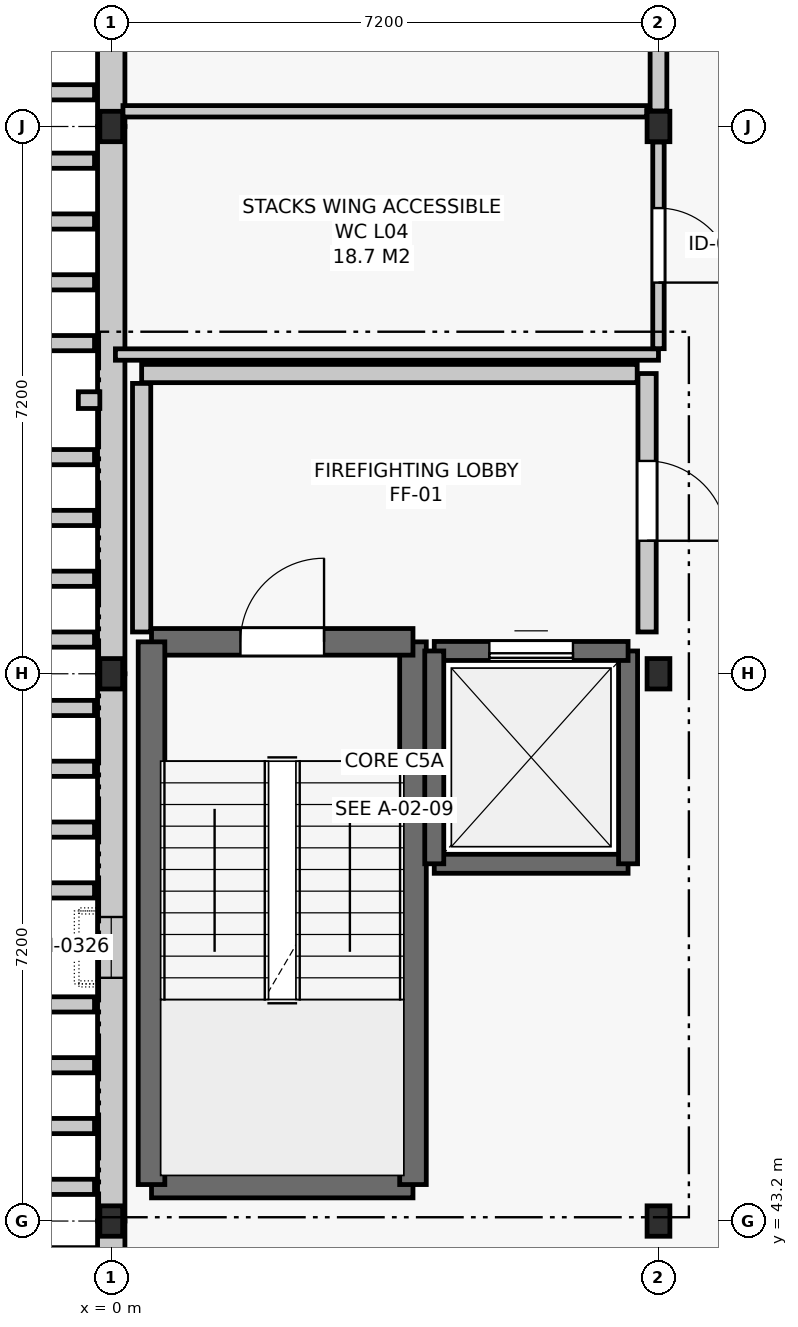
"""IFC4 building model, lengths in metres.
Left out: names, types, materials, properties, quantities, classifications, styles, units other than length and angle.
Written with IfcOpenShell. Run it as: python <this file> out.ifc"""

import sys

from ifc_helpers import new_model, si_unit, direction, frame, frame_2d, origin, origin_2d, place, context, subcontext, project, spatial, rectangle, i_section, extrude, element, fill, save


model = new_model("IFC4")
c1 = context("Model", 3, precision=1e-05, world=origin(), true_north=direction((0.0, 1.0)))
c2 = subcontext(c1, "Body", "Model", "MODEL_VIEW")
j1 = project(units=[si_unit("LENGTHUNIT", "METRE"), si_unit("PLANEANGLEUNIT", "RADIAN")], contexts=[c1])
p1 = place(None, origin())
s1 = spatial("IfcSite", under=j1, at=p1, CompositionType="ELEMENT")
p2 = place(p1, origin())
s2 = spatial("IfcBuilding", under=s1, at=p2, CompositionType="ELEMENT")
p3 = place(p2, frame((0.0, 0.0, 18.6)))
s3 = spatial("IfcBuildingStorey", under=s2, at=p3, CompositionType="ELEMENT", Elevation=18.6)
for number, where, z_axis, x_axis in (
    (1, (0.0, 43.2, 0.0), (0.0, 0.0, 1.0), (1.0, 0.0, 0.0)),
    (2, (0.0, 50.4, 0.0), (0.0, 0.0, 1.0), (1.0, 0.0, 0.0)),
    (3, (0.0, 57.6, 0.0), (0.0, 0.0, 1.0), (1.0, 0.0, 0.0)),
    (4, (7.2, 43.2, 0.0), (0.0, 0.0, 1.0), (1.0, 0.0, 0.0)),
    (5, (7.2, 50.4, 0.0), (0.0, 0.0, 1.0), (1.0, 0.0, 0.0)),
    (6, (7.2, 57.6, 0.0), (0.0, 0.0, 1.0), (1.0, 0.0, 0.0)),
):
    element("IfcColumn", number, at=place(p3, frame(where, z_axis=z_axis, x_axis=x_axis)), inside=s3, PredefinedType="COLUMN", context=c2, shape_type="SweptSolid", body=[
        extrude(i_section(OverallWidth=0.3, OverallDepth=0.4, WebThickness=0.013, FlangeThickness=0.024, FilletRadius=0.027, at=origin_2d()), origin(), (0.0, 0.0, 1.0), 4.2),
    ])
p4 = place(p3, frame((0.0, 64.8, 0.0), z_axis=(0.0, 0.0, 1.0), x_axis=(0.0, -1.0, 0.0)))
e7 = element("IfcWall", 7, at=p4, inside=s3, PredefinedType="SOLIDWALL", context=c2, shape_type="SweptSolid", body=[
    extrude(rectangle(XDim=7.2, YDim=0.36, at=frame_2d((3.6, 0.0))), origin(), (0.0, 0.0, 1.0), 3.06),
])
p5 = place(p4, frame((3.2, 0.0, 0.95)))
e8 = element("IfcOpeningElement", 8, at=p5, cuts=e7, PredefinedType="OPENING", context=c2, shape_type="SweptSolid", body=[
    extrude(rectangle(XDim=0.8, YDim=2.15, at=frame_2d((0.4, 1.075))), frame((0.0, 0.192, 0.0), z_axis=(0.0, -1.0, 0.0), x_axis=(1.0, 0.0, 0.0)), (0.0, 0.0, 1.0), 0.384),
])
p6 = place(p3, frame((0.0, 57.6, 0.0), z_axis=(0.0, 0.0, 1.0), x_axis=(0.0, -1.0, 0.0)))
e9 = element("IfcWall", 9, at=p6, inside=s3, PredefinedType="SOLIDWALL", context=c2, shape_type="SweptSolid", body=[
    extrude(rectangle(XDim=7.2, YDim=0.36, at=frame_2d((3.6, 0.0))), origin(), (0.0, 0.0, 1.0), 3.06),
])
p7 = place(p3, frame((0.0, 50.4, 0.0), z_axis=(0.0, 0.0, 1.0), x_axis=(0.0, -1.0, 0.0)))
e10 = element("IfcWall", 10, at=p7, inside=s3, PredefinedType="SOLIDWALL", context=c2, shape_type="SweptSolid", body=[
    extrude(rectangle(XDim=7.2, YDim=0.36, at=frame_2d((3.6, 0.0))), origin(), (0.0, 0.0, 1.0), 3.06),
])
p8 = place(p7, frame((3.2, 0.0, 0.95)))
e11 = element("IfcOpeningElement", 11, at=p8, cuts=e10, PredefinedType="OPENING", context=c2, shape_type="SweptSolid", body=[
    extrude(rectangle(XDim=0.8, YDim=2.15, at=frame_2d((0.4, 1.075))), frame((0.0, 0.192, 0.0), z_axis=(0.0, -1.0, 0.0), x_axis=(1.0, 0.0, 0.0)), (0.0, 0.0, 1.0), 0.384),
])
p9 = place(p3, frame((0.0, 43.2, 0.0), z_axis=(0.0, 0.0, 1.0), x_axis=(0.0, -1.0, 0.0)))
e12 = element("IfcWall", 12, at=p9, inside=s3, PredefinedType="SOLIDWALL", context=c2, shape_type="SweptSolid", body=[
    extrude(rectangle(XDim=6.996, YDim=0.36, at=frame_2d((3.498, 0.0))), origin(), (0.0, 0.0, 1.0), 3.06),
])
p10 = place(p9, frame((3.2, 0.0, 0.95)))
e13 = element("IfcOpeningElement", 13, at=p10, cuts=e12, PredefinedType="OPENING", context=c2, shape_type="SweptSolid", body=[
    extrude(rectangle(XDim=0.8, YDim=2.15, at=frame_2d((0.4, 1.075))), frame((0.0, 0.192, 0.0), z_axis=(0.0, -1.0, 0.0), x_axis=(1.0, 0.0, 0.0)), (0.0, 0.0, 1.0), 0.384),
])
for number, where, z_axis, x_axis in (
    (14, (-1.66, 43.65, 0.0), (0.0, 0.0, 1.0), (1.0, 0.0, 0.0)),
    (15, (-1.66, 44.45, 0.0), (0.0, 0.0, 1.0), (1.0, 0.0, 0.0)),
    (16, (-1.66, 45.25, 0.0), (0.0, 0.0, 1.0), (1.0, 0.0, 0.0)),
    (17, (-1.66, 46.05, 0.0), (0.0, 0.0, 1.0), (1.0, 0.0, 0.0)),
    (18, (-1.66, 47.55, 0.0), (0.0, 0.0, 1.0), (1.0, 0.0, 0.0)),
    (19, (-1.66, 48.35, 0.0), (0.0, 0.0, 1.0), (1.0, 0.0, 0.0)),
    (20, (-1.66, 49.15, 0.0), (0.0, 0.0, 1.0), (1.0, 0.0, 0.0)),
    (21, (-1.66, 49.95, 0.0), (0.0, 0.0, 1.0), (1.0, 0.0, 0.0)),
    (22, (-1.66, 50.85, 0.0), (0.0, 0.0, 1.0), (1.0, 0.0, 0.0)),
    (23, (-1.66, 51.65, 0.0), (0.0, 0.0, 1.0), (1.0, 0.0, 0.0)),
    (24, (-1.66, 52.45, 0.0), (0.0, 0.0, 1.0), (1.0, 0.0, 0.0)),
    (25, (-1.66, 53.25, 0.0), (0.0, 0.0, 1.0), (1.0, 0.0, 0.0)),
    (26, (-1.66, 54.75, 0.0), (0.0, 0.0, 1.0), (1.0, 0.0, 0.0)),
    (27, (-1.66, 55.55, 0.0), (0.0, 0.0, 1.0), (1.0, 0.0, 0.0)),
    (28, (-1.66, 56.35, 0.0), (0.0, 0.0, 1.0), (1.0, 0.0, 0.0)),
    (29, (-1.66, 57.15, 0.0), (0.0, 0.0, 1.0), (1.0, 0.0, 0.0)),
    (30, (-1.66, 58.05, 0.0), (0.0, 0.0, 1.0), (1.0, 0.0, 0.0)),
):
    element("IfcWall", number, at=place(p3, frame(where, z_axis=z_axis, x_axis=x_axis)), inside=s3, PredefinedType="SOLIDWALL", context=c2, shape_type="SweptSolid", body=[
        extrude(rectangle(XDim=1.44, YDim=0.2, at=frame_2d((0.72, 0.0))), origin(), (0.0, 0.0, 1.0), 4.2),
    ])
p11 = place(p3, frame((0.53, 43.68, 0.0), z_axis=(0.0, 0.0, 1.0), x_axis=(1.0, 0.0, 0.0)))
e31 = element("IfcWall", 31, at=p11, inside=s3, PredefinedType="SHEAR", context=c2, shape_type="SweptSolid", body=[
    extrude(rectangle(XDim=3.44, YDim=0.35, at=frame_2d((1.72, 0.0))), origin(), (0.0, 0.0, 1.0), 3.94),
])
p12 = place(p3, frame((3.97, 43.68, 0.0), z_axis=(0.0, 0.0, 1.0), x_axis=(0.0, 1.0, 0.0)))
e32 = element("IfcWall", 32, at=p12, inside=s3, PredefinedType="SHEAR", context=c2, shape_type="SweptSolid", body=[
    extrude(rectangle(XDim=7.14, YDim=0.35, at=frame_2d((3.57, 0.0))), origin(), (0.0, 0.0, 1.0), 3.94),
])
p13 = place(p3, frame((3.97, 50.82, 0.0), z_axis=(0.0, 0.0, 1.0), x_axis=(-1.0, 0.0, 0.0)))
e33 = element("IfcWall", 33, at=p13, inside=s3, PredefinedType="SHEAR", context=c2, shape_type="SweptSolid", body=[
    extrude(rectangle(XDim=3.44, YDim=0.35, at=frame_2d((1.72, 0.0))), origin(), (0.0, 0.0, 1.0), 3.94),
])
p14 = place(p13, frame((1.17, 0.0, 0.0)))
e34 = element("IfcOpeningElement", 34, at=p14, cuts=e33, PredefinedType="OPENING", context=c2, shape_type="SweptSolid", body=[
    extrude(rectangle(XDim=1.1, YDim=2.15, at=frame_2d((0.55, 1.075))), frame((0.0, 0.187, 0.0), z_axis=(0.0, -1.0, 0.0), x_axis=(1.0, 0.0, 0.0)), (0.0, 0.0, 1.0), 0.374),
])
p15 = place(p3, frame((0.53, 50.82, 0.0), z_axis=(0.0, 0.0, 1.0), x_axis=(0.0, -1.0, 0.0)))
e35 = element("IfcWall", 35, at=p15, inside=s3, PredefinedType="SHEAR", context=c2, shape_type="SweptSolid", body=[
    extrude(rectangle(XDim=7.14, YDim=0.35, at=frame_2d((3.57, 0.0))), origin(), (0.0, 0.0, 1.0), 3.94),
])
p16 = place(p3, frame((7.05, 50.95, 0.0), z_axis=(0.0, 0.0, 1.0), x_axis=(0.0, 1.0, 0.0)))
e36 = element("IfcWall", 36, at=p16, inside=s3, PredefinedType="SOLIDWALL", context=c2, shape_type="SweptSolid", body=[
    extrude(rectangle(XDim=3.4, YDim=0.24, at=frame_2d((1.7, 0.0))), origin(), (0.0, 0.0, 1.0), 3.2),
])
p17 = place(p16, frame((1.2, 0.0, 0.0)))
e37 = element("IfcOpeningElement", 37, at=p17, cuts=e36, PredefinedType="OPENING", context=c2, shape_type="SweptSolid", body=[
    extrude(rectangle(XDim=1.05, YDim=2.15, at=frame_2d((0.525, 1.075))), frame((0.0, 0.132, 0.0), z_axis=(0.0, -1.0, 0.0), x_axis=(1.0, 0.0, 0.0)), (0.0, 0.0, 1.0), 0.264),
])
p18 = place(p3, frame((0.4, 54.35, 0.0), z_axis=(0.0, 0.0, 1.0), x_axis=(1.0, 0.0, 0.0)))
e38 = element("IfcWall", 38, at=p18, inside=s3, PredefinedType="SOLIDWALL", context=c2, shape_type="SweptSolid", body=[
    extrude(rectangle(XDim=6.52, YDim=0.24, at=frame_2d((3.26, 0.0))), origin(), (0.0, 0.0, 1.0), 3.2),
])
p19 = place(p3, frame((0.4, 50.95, 0.0), z_axis=(0.0, 0.0, 1.0), x_axis=(0.0, 1.0, 0.0)))
e39 = element("IfcWall", 39, at=p19, inside=s3, PredefinedType="SOLIDWALL", context=c2, shape_type="SweptSolid", body=[
    extrude(rectangle(XDim=3.27, YDim=0.24, at=frame_2d((1.635, 0.0))), origin(), (0.0, 0.0, 1.0), 3.2),
])
p20 = place(p3, frame((4.25, 47.9, 0.0), z_axis=(0.0, 0.0, 1.0), x_axis=(1.0, 0.0, 0.0)))
e40 = element("IfcWall", 40, at=p20, inside=s3, PredefinedType="SHEAR", context=c2, shape_type="SweptSolid", body=[
    extrude(rectangle(XDim=2.55, YDim=0.25, at=frame_2d((1.275, 0.0))), origin(), (0.0, 0.0, 1.0), 3.94),
])
p21 = place(p3, frame((6.8, 47.9, 0.0), z_axis=(0.0, 0.0, 1.0), x_axis=(0.0, 1.0, 0.0)))
e41 = element("IfcWall", 41, at=p21, inside=s3, PredefinedType="SHEAR", context=c2, shape_type="SweptSolid", body=[
    extrude(rectangle(XDim=2.8, YDim=0.25, at=frame_2d((1.4, 0.0))), origin(), (0.0, 0.0, 1.0), 3.94),
])
p22 = place(p3, frame((6.8, 50.7, 0.0), z_axis=(0.0, 0.0, 1.0), x_axis=(-1.0, 0.0, 0.0)))
e42 = element("IfcWall", 42, at=p22, inside=s3, PredefinedType="SHEAR", context=c2, shape_type="SweptSolid", body=[
    extrude(rectangle(XDim=2.55, YDim=0.25, at=frame_2d((1.275, 0.0))), origin(), (0.0, 0.0, 1.0), 3.94),
])
p23 = place(p22, frame((0.725, 0.0, 0.0)))
e43 = element("IfcOpeningElement", 43, at=p23, cuts=e42, PredefinedType="OPENING", context=c2, shape_type="SweptSolid", body=[
    extrude(rectangle(XDim=1.1, YDim=2.1, at=frame_2d((0.55, 1.05))), frame((0.0, 0.137, 0.0), z_axis=(0.0, -1.0, 0.0), x_axis=(1.0, 0.0, 0.0)), (0.0, 0.0, 1.0), 0.274),
])
p24 = place(p3, frame((4.25, 50.7, 0.0), z_axis=(0.0, 0.0, 1.0), x_axis=(0.0, -1.0, 0.0)))
e44 = element("IfcWall", 44, at=p24, inside=s3, PredefinedType="SHEAR", context=c2, shape_type="SweptSolid", body=[
    extrude(rectangle(XDim=2.8, YDim=0.25, at=frame_2d((1.4, 0.0))), origin(), (0.0, 0.0, 1.0), 3.94),
])
p25 = place(p3, frame((0.055, 54.6, 0.0), z_axis=(0.0, 0.0, 1.0), x_axis=(1.0, 0.0, 0.0)))
e45 = element("IfcWall", 45, at=p25, inside=s3, PredefinedType="PARTITIONING", context=c2, shape_type="SweptSolid", body=[
    extrude(rectangle(XDim=7.145, YDim=0.15, at=frame_2d((3.573, 0.0))), origin(), (0.0, 0.0, 1.0), 3.172),
])
p26 = place(p3, frame((0.154, 57.8, 0.0), z_axis=(0.0, 0.0, 1.0), x_axis=(1.0, 0.0, 0.0)))
e46 = element("IfcWall", 46, at=p26, inside=s3, PredefinedType="PARTITIONING", context=c2, shape_type="SweptSolid", body=[
    extrude(rectangle(XDim=6.892, YDim=0.15, at=frame_2d((3.446, 0.0))), origin(), (0.0, 0.0, 1.0), 3.375),
])
p27 = place(p3, frame((7.2, 54.677, 0.0), z_axis=(0.0, 0.0, 1.0), x_axis=(0.0, 1.0, 0.0)))
e47 = element("IfcWall", 47, at=p27, inside=s3, PredefinedType="PARTITIONING", context=c2, shape_type="SweptSolid", body=[
    extrude(rectangle(XDim=2.719, YDim=0.15, at=frame_2d((1.359, 0.0))), origin(), (0.0, 0.0, 1.0), 3.385),
])
p28 = place(p27, frame((0.869, 0.0, 0.0)))
e48 = element("IfcOpeningElement", 48, at=p28, cuts=e47, PredefinedType="OPENING", context=c2, shape_type="SweptSolid", body=[
    extrude(rectangle(XDim=0.98, YDim=2.1, at=frame_2d((0.49, 1.05))), frame((0.0, 0.087, 0.0), z_axis=(0.0, -1.0, 0.0), x_axis=(1.0, 0.0, 0.0)), (0.0, 0.0, 1.0), 0.174),
])
p29 = place(p3, frame((7.2, 57.804, 0.0), z_axis=(0.0, 0.0, 1.0), x_axis=(0.0, 1.0, 0.0)))
e49 = element("IfcWall", 49, at=p29, inside=s3, PredefinedType="SOLIDWALL", context=c2, shape_type="SweptSolid", body=[
    extrude(rectangle(XDim=6.792, YDim=0.22, at=frame_2d((3.396, 0.0))), origin(), (0.0, 0.0, 1.0), 3.385),
])
p30 = place(p29, frame((2.796, 0.0, 0.0)))
e50 = element("IfcOpeningElement", 50, at=p30, cuts=e49, PredefinedType="OPENING", context=c2, shape_type="SweptSolid", body=[
    extrude(rectangle(XDim=1.2, YDim=2.2, at=frame_2d((0.6, 1.1))), frame((0.0, 0.122, 0.0), z_axis=(0.0, -1.0, 0.0), x_axis=(1.0, 0.0, 0.0)), (0.0, 0.0, 1.0), 0.244),
])
p31 = place(p8, origin())
e51 = element("IfcWindow", 51, at=p31, inside=s3, PartitioningType="SINGLE_PANEL", PredefinedType="WINDOW", context=c2, shape_type="SweptSolid", body=[
    extrude(rectangle(XDim=0.8, YDim=2.15, at=frame_2d((0.4, 1.075))), frame((0.0, 0.03, 0.0), z_axis=(0.0, -1.0, 0.0), x_axis=(1.0, 0.0, 0.0)), (0.0, 0.0, 1.0), 0.06),
])
fill(e11, e51)
p32 = place(p14, frame((1.1, 0.0, 0.0), z_axis=(0.0, 0.0, 1.0), x_axis=(-1.0, 0.0, 0.0)))
e52 = element("IfcDoor", 52, at=p32, inside=s3, OperationType="SINGLE_SWING_RIGHT", PredefinedType="DOOR", context=c2, shape_type="SweptSolid", body=[
    extrude(rectangle(XDim=1.1, YDim=2.15, at=frame_2d((0.55, 1.075))), frame((0.0, 0.025, 0.0), z_axis=(0.0, -1.0, 0.0), x_axis=(1.0, 0.0, 0.0)), (0.0, 0.0, 1.0), 0.05),
])
fill(e34, e52)
p33 = place(p17, frame((1.05, 0.0, 0.0), z_axis=(0.0, 0.0, 1.0), x_axis=(-1.0, 0.0, 0.0)))
e53 = element("IfcDoor", 53, at=p33, inside=s3, OperationType="SINGLE_SWING_RIGHT", PredefinedType="DOOR", context=c2, shape_type="SweptSolid", body=[
    extrude(rectangle(XDim=1.05, YDim=2.15, at=frame_2d((0.525, 1.075))), frame((0.0, 0.025, 0.0), z_axis=(0.0, -1.0, 0.0), x_axis=(1.0, 0.0, 0.0)), (0.0, 0.0, 1.0), 0.05),
])
fill(e37, e53)
p34 = place(p23, origin())
e54 = element("IfcDoor", 54, at=p34, inside=s3, OperationType="SLIDING_TO_RIGHT", PredefinedType="DOOR", context=c2, shape_type="SweptSolid", body=[
    extrude(rectangle(XDim=1.1, YDim=2.1, at=frame_2d((0.55, 1.05))), frame((0.0, 0.025, 0.0), z_axis=(0.0, -1.0, 0.0), x_axis=(1.0, 0.0, 0.0)), (0.0, 0.0, 1.0), 0.05),
])
fill(e43, e54)
p35 = place(p28, frame((0.98, 0.0, 0.0), z_axis=(0.0, 0.0, 1.0), x_axis=(-1.0, 0.0, 0.0)))
e55 = element("IfcDoor", 55, at=p35, inside=s3, OperationType="SINGLE_SWING_RIGHT", PredefinedType="DOOR", context=c2, shape_type="SweptSolid", body=[
    extrude(rectangle(XDim=0.98, YDim=2.1, at=frame_2d((0.49, 1.05))), frame((0.0, 0.025, 0.0), z_axis=(0.0, -1.0, 0.0), x_axis=(1.0, 0.0, 0.0)), (0.0, 0.0, 1.0), 0.05),
])
fill(e48, e55)
save(model, sys.argv[1])
